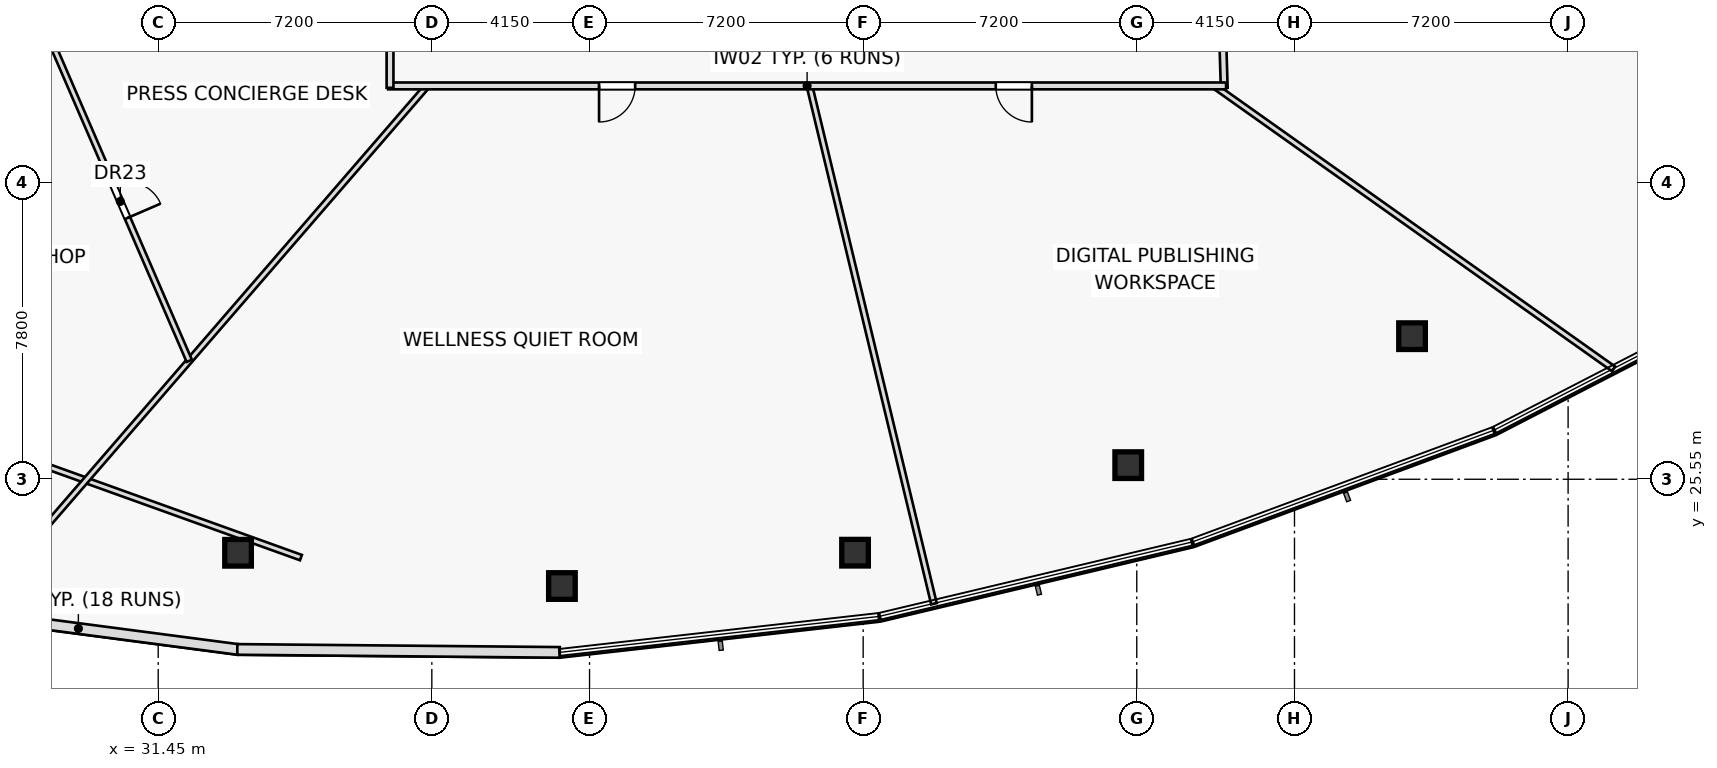
"""IFC4 building model, lengths in metres.
Left out: names, types, materials, properties, quantities, classifications, styles, units other than length and angle.
Written with IfcOpenShell. Run it as: python <this file> out.ifc"""

import sys

from ifc_helpers import new_model, si_unit, direction, frame, frame_2d, origin, origin_2d, place, context, subcontext, project, spatial, rectangle, hollow_rectangle, extrude, element, fill, save


model = new_model("IFC4")
c1 = context("Model", 3, precision=1e-05, world=origin(), true_north=direction((0.0, 1.0)))
c2 = subcontext(c1, "Body", "Model", "MODEL_VIEW")
j1 = project(units=[si_unit("LENGTHUNIT", "METRE"), si_unit("PLANEANGLEUNIT", "RADIAN")], contexts=[c1])
p1 = place(None, origin())
s1 = spatial("IfcSite", under=j1, at=p1, CompositionType="ELEMENT")
p2 = place(p1, origin())
s2 = spatial("IfcBuilding", under=s1, at=p2, CompositionType="ELEMENT")
p3 = place(p2, frame((0.0, 0.0, 66.6)))
s3 = spatial("IfcBuildingStorey", under=s2, at=p3, CompositionType="ELEMENT", Elevation=66.6)
for number, where, z_axis, x_axis in (
    (1, (33.551, 23.615, 0.0), (0.0, 0.0, 1.0), (1.0, 0.0, 0.0)),
    (2, (42.073, 22.74, 0.0), (0.0, 0.0, 1.0), (1.0, 0.0, 0.0)),
    (3, (49.787, 23.618, 0.0), (0.0, 0.0, 1.0), (1.0, 0.0, 0.0)),
    (4, (56.975, 25.921, 0.0), (0.0, 0.0, 1.0), (1.0, 0.0, 0.0)),
    (5, (64.444, 29.315, 0.0), (0.0, 0.0, 1.0), (1.0, 0.0, 0.0)),
):
    element("IfcColumn", number, at=place(p3, frame(where, z_axis=z_axis, x_axis=x_axis)), inside=s3, PredefinedType="COLUMN", context=c2, shape_type="SweptSolid", body=[
        extrude(hollow_rectangle(XDim=0.7, YDim=0.7, WallThickness=0.04, at=origin_2d()), origin(), (0.0, 0.0, 1.0), 3.6),
    ])
p4 = place(p3, frame((22.802, 27.945, 0.0), z_axis=(0.0, 0.0, 1.0), x_axis=(0.941102349209, -0.338121824662, 0.0)))
e6 = element("IfcWall", 6, at=p4, inside=s3, PredefinedType="PARTITIONING", context=c2, shape_type="SweptSolid", body=[
    extrude(rectangle(XDim=13.18, YDim=0.15, at=frame_2d((6.59, 0.0))), origin(), (0.0, 0.0, 1.0), 2.975),
])
p5 = place(p3, frame((37.55, 41.042, 0.0), z_axis=(0.0, 0.0, 1.0), x_axis=(-0.912858301538, -0.408276525547, 0.0)))
e7 = element("IfcWall", 7, at=p5, inside=s3, PredefinedType="PARTITIONING", context=c2, shape_type="SweptSolid", body=[
    extrude(rectangle(XDim=18.775, YDim=0.15, at=frame_2d((9.387, 0.0))), origin(), (0.0, 0.0, 1.0), 2.975),
])
p6 = place(p3, frame((38.526, 35.9, 0.0), z_axis=(0.0, 0.0, 1.0), x_axis=(-0.654320997638, -0.756216921293, 0.0)))
e8 = element("IfcWall", 8, at=p6, inside=s3, PredefinedType="PARTITIONING", context=c2, shape_type="SweptSolid", body=[
    extrude(rectangle(XDim=18.396, YDim=0.15, at=frame_2d((9.198, 0.0))), origin(), (0.0, 0.0, 1.0), 2.975),
])
p7 = place(p3, frame((48.588, 35.9, 0.0), z_axis=(0.0, 0.0, 1.0), x_axis=(0.233733341708, -0.972300737927, 0.0)))
e9 = element("IfcWall", 9, at=p7, inside=s3, PredefinedType="PARTITIONING", context=c2, shape_type="SweptSolid", body=[
    extrude(rectangle(XDim=14.014, YDim=0.15, at=frame_2d((7.007, 0.0))), origin(), (0.0, 0.0, 1.0), 3.025),
])
p8 = place(p3, frame((59.24, 35.9, 0.0), z_axis=(0.0, 0.0, 1.0), x_axis=(0.815881019965, -0.578219820883, 0.0)))
e10 = element("IfcWall", 10, at=p8, inside=s3, PredefinedType="PARTITIONING", context=c2, shape_type="SweptSolid", body=[
    extrude(rectangle(XDim=12.879, YDim=0.15, at=frame_2d((6.439, 0.0))), origin(), (0.0, 0.0, 1.0), 2.975),
])
p9 = place(p3, frame((28.638, 37.056, 0.0), z_axis=(0.0, 0.0, 1.0), x_axis=(0.396979257651, -0.9178275813, 0.0)))
e11 = element("IfcWall", 11, at=p9, inside=s3, PredefinedType="PARTITIONING", context=c2, shape_type="SweptSolid", body=[
    extrude(rectangle(XDim=9.141, YDim=0.15, at=frame_2d((4.571, 0.0))), origin(), (0.0, 0.0, 1.0), 2.975),
])
p10 = place(p9, frame((4.096, 0.0, 0.0)))
e12 = element("IfcOpeningElement", 12, at=p10, cuts=e11, PredefinedType="OPENING", context=c2, shape_type="SweptSolid", body=[
    extrude(rectangle(XDim=0.95, YDim=2.05, at=frame_2d((0.475, 1.025))), frame((0.0, 0.085, 0.0), z_axis=(0.0, -1.0, 0.0), x_axis=(1.0, 0.0, 0.0)), (0.0, 0.0, 1.0), 0.17),
])
p11 = place(p3, frame((59.342, 41.1, 0.0), z_axis=(0.0, 0.0, 1.0), x_axis=(0.030445329425, -0.999536433511, 0.0)))
e13 = element("IfcWall", 13, at=p11, inside=s3, PredefinedType="PARTITIONING", context=c2, shape_type="SweptSolid", body=[
    extrude(rectangle(XDim=5.252, YDim=0.18, at=frame_2d((2.626, 0.0))), origin(), (0.0, 0.0, 1.0), 2.975),
])
p12 = place(p11, frame((2.151, 0.0, 0.0)))
e14 = element("IfcOpeningElement", 14, at=p12, cuts=e13, PredefinedType="OPENING", context=c2, shape_type="SweptSolid", body=[
    extrude(rectangle(XDim=0.95, YDim=2.05, at=frame_2d((0.475, 1.025))), frame((0.0, 0.1, 0.0), z_axis=(0.0, -1.0, 0.0), x_axis=(1.0, 0.0, 0.0)), (0.0, 0.0, 1.0), 0.2),
])
p13 = place(p3, frame((59.55, 35.9, 0.0), z_axis=(0.0, 0.0, 1.0), x_axis=(-1.0, 0.0, 0.0)))
e15 = element("IfcWall", 15, at=p13, inside=s3, PredefinedType="PARTITIONING", context=c2, shape_type="SweptSolid", body=[
    extrude(rectangle(XDim=22.05, YDim=0.18, at=frame_2d((11.025, 0.0))), origin(), (0.0, 0.0, 1.0), 2.975),
])
p14 = place(p13, frame((5.11, 0.0, 0.0)))
e16 = element("IfcOpeningElement", 16, at=p14, cuts=e15, PredefinedType="OPENING", context=c2, shape_type="SweptSolid", body=[
    extrude(rectangle(XDim=0.95, YDim=2.05, at=frame_2d((0.475, 1.025))), frame((0.0, 0.1, 0.0), z_axis=(0.0, -1.0, 0.0), x_axis=(1.0, 0.0, 0.0)), (0.0, 0.0, 1.0), 0.2),
])
p15 = place(p13, frame((15.55, 0.0, 0.0)))
e17 = element("IfcOpeningElement", 17, at=p15, cuts=e15, PredefinedType="OPENING", context=c2, shape_type="SweptSolid", body=[
    extrude(rectangle(XDim=0.95, YDim=2.05, at=frame_2d((0.475, 1.025))), frame((0.0, 0.1, 0.0), z_axis=(0.0, -1.0, 0.0), x_axis=(1.0, 0.0, 0.0)), (0.0, 0.0, 1.0), 0.2),
])
p16 = place(p3, frame((37.55, 35.85, 0.0), z_axis=(0.0, 0.0, 1.0), x_axis=(0.0, 1.0, 0.0)))
e18 = element("IfcWall", 18, at=p16, inside=s3, PredefinedType="PARTITIONING", context=c2, shape_type="SweptSolid", body=[
    extrude(rectangle(XDim=12.65, YDim=0.18, at=frame_2d((6.325, 0.0))), origin(), (0.0, 0.0, 1.0), 2.975),
])
p17 = place(p16, frame((2.211, 0.0, 0.0)))
e19 = element("IfcOpeningElement", 19, at=p17, cuts=e18, PredefinedType="OPENING", context=c2, shape_type="SweptSolid", body=[
    extrude(rectangle(XDim=0.95, YDim=2.05, at=frame_2d((0.475, 1.025))), frame((0.0, 0.1, 0.0), z_axis=(0.0, -1.0, 0.0), x_axis=(1.0, 0.0, 0.0)), (0.0, 0.0, 1.0), 0.2),
])
p18 = place(p16, frame((7.143, 0.0, 0.0)))
e20 = element("IfcOpeningElement", 20, at=p18, cuts=e18, PredefinedType="OPENING", context=c2, shape_type="SweptSolid", body=[
    extrude(rectangle(XDim=0.95, YDim=2.05, at=frame_2d((0.475, 1.025))), frame((0.0, 0.1, 0.0), z_axis=(0.0, -1.0, 0.0), x_axis=(1.0, 0.0, 0.0)), (0.0, 0.0, 1.0), 0.2),
])
p19 = place(p16, frame((10.774, 0.0, 0.0)))
e21 = element("IfcOpeningElement", 21, at=p19, cuts=e18, PredefinedType="OPENING", context=c2, shape_type="SweptSolid", body=[
    extrude(rectangle(XDim=0.95, YDim=2.05, at=frame_2d((0.475, 1.025))), frame((0.0, 0.1, 0.0), z_axis=(0.0, -1.0, 0.0), x_axis=(1.0, 0.0, 0.0)), (0.0, 0.0, 1.0), 0.2),
])
p20 = place(p3, frame((25.137, 22.176, 0.0), z_axis=(0.0, 0.0, 1.0), x_axis=(0.991499810611, -0.130108130251, 0.0)))
e22 = element("IfcWall", 22, at=p20, inside=s3, PredefinedType="STANDARD", context=c2, shape_type="SweptSolid", body=[
    extrude(rectangle(XDim=8.497, YDim=0.28, at=frame_2d((4.248, 0.0))), origin(), (0.0, 0.0, 1.0), 3.6),
])
p21 = place(p3, frame((33.531, 21.072, 0.0), z_axis=(0.0, 0.0, 1.0), x_axis=(0.999957872633, -0.009178941108, 0.0)))
e23 = element("IfcWall", 23, at=p21, inside=s3, PredefinedType="STANDARD", context=c2, shape_type="SweptSolid", body=[
    extrude(rectangle(XDim=8.485, YDim=0.28, at=frame_2d((4.242, 0.0))), origin(), (0.0, 0.0, 1.0), 3.6),
])
p22 = place(p10, origin())
e24 = element("IfcDoor", 24, at=p22, inside=s3, OperationType="SINGLE_SWING_RIGHT", PredefinedType="DOOR", context=c2, shape_type="SweptSolid", body=[
    extrude(rectangle(XDim=0.95, YDim=2.05, at=frame_2d((0.475, 1.025))), frame((0.0, 0.025, 0.0), z_axis=(0.0, -1.0, 0.0), x_axis=(1.0, 0.0, 0.0)), (0.0, 0.0, 1.0), 0.05),
])
fill(e12, e24)
p23 = place(p14, origin())
e25 = element("IfcDoor", 25, at=p23, inside=s3, OperationType="SINGLE_SWING_LEFT", PredefinedType="DOOR", context=c2, shape_type="SweptSolid", body=[
    extrude(rectangle(XDim=0.95, YDim=2.05, at=frame_2d((0.475, 1.025))), frame((0.0, 0.025, 0.0), z_axis=(0.0, -1.0, 0.0), x_axis=(1.0, 0.0, 0.0)), (0.0, 0.0, 1.0), 0.05),
])
fill(e16, e25)
p24 = place(p15, origin())
e26 = element("IfcDoor", 26, at=p24, inside=s3, OperationType="SINGLE_SWING_RIGHT", PredefinedType="DOOR", context=c2, shape_type="SweptSolid", body=[
    extrude(rectangle(XDim=0.95, YDim=2.05, at=frame_2d((0.475, 1.025))), frame((0.0, 0.025, 0.0), z_axis=(0.0, -1.0, 0.0), x_axis=(1.0, 0.0, 0.0)), (0.0, 0.0, 1.0), 0.05),
])
fill(e17, e26)
save(model, sys.argv[1])
